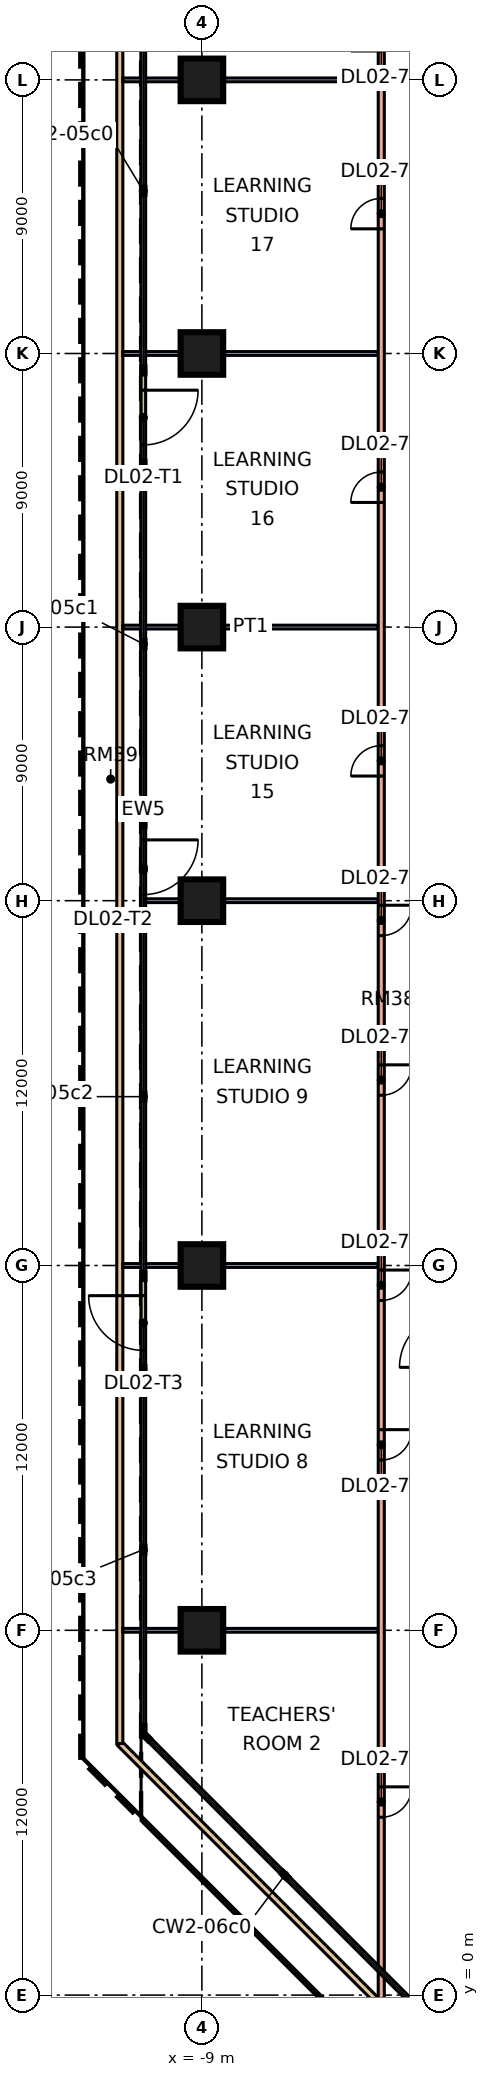
"""IFC4 building model, lengths in metres.
Left out: names, types, materials, properties, quantities, classifications, styles, units other than length and angle.
Written with IfcOpenShell. Run it as: python <this file> out.ifc"""

import sys

from ifc_helpers import new_model, si_unit, direction, frame, frame_2d, origin, origin_2d, place, context, subcontext, project, spatial, rectangle, extrude, element, fill, save


model = new_model("IFC4")
c1 = context("Model", 3, precision=1e-05, world=origin(), true_north=direction((0.0, 1.0)))
c2 = subcontext(c1, "Body", "Model", "MODEL_VIEW")
j1 = project(units=[si_unit("LENGTHUNIT", "METRE"), si_unit("PLANEANGLEUNIT", "RADIAN")], contexts=[c1])
p1 = place(None, origin())
s1 = spatial("IfcSite", under=j1, at=p1, CompositionType="ELEMENT")
p2 = place(p1, origin())
s2 = spatial("IfcBuilding", under=s1, at=p2, CompositionType="ELEMENT")
p3 = place(p2, frame((0.0, 0.0, 12.0)))
s3 = spatial("IfcBuildingStorey", under=s2, at=p3, CompositionType="ELEMENT", Elevation=12.0)
for number, where, z_axis, x_axis in (
    (1, (-9.0, 12.0, 0.0), (0.0, 0.0, 1.0), (1.0, 0.0, 0.0)),
    (2, (-9.0, 24.0, 0.0), (0.0, 0.0, 1.0), (1.0, 0.0, 0.0)),
    (3, (-9.0, 36.0, 0.0), (0.0, 0.0, 1.0), (1.0, 0.0, 0.0)),
    (4, (-9.0, 45.0, 0.0), (0.0, 0.0, 1.0), (1.0, 0.0, 0.0)),
    (5, (-9.0, 54.0, 0.0), (0.0, 0.0, 1.0), (1.0, 0.0, 0.0)),
    (6, (-9.0, 63.0, 0.0), (0.0, 0.0, 1.0), (1.0, 0.0, 0.0)),
):
    element("IfcColumn", number, at=place(p3, frame(where, z_axis=z_axis, x_axis=x_axis)), inside=s3, PredefinedType="COLUMN", context=c2, shape_type="SweptSolid", body=[
        extrude(rectangle(XDim=1.4, YDim=1.4, at=origin_2d()), origin(), (0.0, 0.0, 1.0), 4.8),
    ])
p4 = place(p3, frame((-10.925, 53.393, 0.0), z_axis=(0.0, 0.0, 1.0), x_axis=(0.0, -1.0, 0.0)))
e7 = element("IfcWall", 7, at=p4, inside=s3, PredefinedType="SOLIDWALL", context=c2, shape_type="SweptSolid", body=[
    extrude(rectangle(XDim=3.0, YDim=0.15, at=frame_2d((1.5, 0.0))), origin(), (0.0, 0.0, 1.0), 4.4),
])
p5 = place(p4, frame((0.6, 0.0, 0.0)))
e8 = element("IfcOpeningElement", 8, at=p5, cuts=e7, PredefinedType="OPENING", context=c2, shape_type="SweptSolid", body=[
    extrude(rectangle(XDim=1.8, YDim=2.4, at=frame_2d((0.9, 1.2))), frame((0.0, 0.085, 0.0), z_axis=(0.0, -1.0, 0.0), x_axis=(1.0, 0.0, 0.0)), (0.0, 0.0, 1.0), 0.17),
])
p6 = place(p3, frame((-10.925, 38.5, 0.0), z_axis=(0.0, 0.0, 1.0), x_axis=(0.0, -1.0, 0.0)))
e9 = element("IfcWall", 9, at=p6, inside=s3, PredefinedType="SOLIDWALL", context=c2, shape_type="SweptSolid", body=[
    extrude(rectangle(XDim=3.0, YDim=0.15, at=frame_2d((1.5, 0.0))), origin(), (0.0, 0.0, 1.0), 4.4),
])
p7 = place(p6, frame((0.5, 0.0, 0.0)))
e10 = element("IfcOpeningElement", 10, at=p7, cuts=e9, PredefinedType="OPENING", context=c2, shape_type="SweptSolid", body=[
    extrude(rectangle(XDim=1.8, YDim=2.4, at=frame_2d((0.9, 1.2))), frame((0.0, 0.085, 0.0), z_axis=(0.0, -1.0, 0.0), x_axis=(1.0, 0.0, 0.0)), (0.0, 0.0, 1.0), 0.17),
])
p8 = place(p3, frame((-10.925, 23.607, 0.0), z_axis=(0.0, 0.0, 1.0), x_axis=(0.0, -1.0, 0.0)))
e11 = element("IfcWall", 11, at=p8, inside=s3, PredefinedType="SOLIDWALL", context=c2, shape_type="SweptSolid", body=[
    extrude(rectangle(XDim=3.0, YDim=0.15, at=frame_2d((1.5, 0.0))), origin(), (0.0, 0.0, 1.0), 4.4),
])
p9 = place(p8, frame((0.6, 0.0, 0.0)))
e12 = element("IfcOpeningElement", 12, at=p9, cuts=e11, PredefinedType="OPENING", context=c2, shape_type="SweptSolid", body=[
    extrude(rectangle(XDim=1.8, YDim=2.4, at=frame_2d((0.9, 1.2))), frame((0.0, 0.085, 0.0), z_axis=(0.0, -1.0, 0.0), x_axis=(1.0, 0.0, 0.0)), (0.0, 0.0, 1.0), 0.17),
])
p10 = place(p3, frame((8.275, -11.7, 0.0), z_axis=(0.0, 0.0, 1.0), x_axis=(-0.707106781187, 0.707106781187, 0.0)))
e13 = element("IfcWall", 13, at=p10, inside=s3, PredefinedType="PARAPET", context=c2, shape_type="SweptSolid", body=[
    extrude(rectangle(XDim=28.249, YDim=0.2, at=frame_2d((14.125, 0.0))), origin(), (0.0, 0.0, 1.0), 0.5),
])
p11 = place(p3, frame((-11.7, 8.275, 0.0), z_axis=(0.0, 0.0, 1.0), x_axis=(0.0, 1.0, 0.0)))
e14 = element("IfcWall", 14, at=p11, inside=s3, PredefinedType="PARAPET", context=c2, shape_type="SweptSolid", body=[
    extrude(rectangle(XDim=57.45, YDim=0.2, at=frame_2d((28.725, 0.0))), origin(), (0.0, 0.0, 1.0), 0.5),
])
for number, where, z_axis, x_axis in (
    (15, (-11.6, 12.0, 0.0), (0.0, 0.0, 1.0), (1.0, 0.0, 0.0)),
    (16, (-11.6, 24.0, 0.0), (0.0, 0.0, 1.0), (1.0, 0.0, 0.0)),
    (17, (-11.6, 45.0, 0.0), (0.0, 0.0, 1.0), (1.0, 0.0, 0.0)),
    (18, (-11.6, 54.0, 0.0), (0.0, 0.0, 1.0), (1.0, 0.0, 0.0)),
    (19, (-11.6, 63.0, 0.0), (0.0, 0.0, 1.0), (1.0, 0.0, 0.0)),
):
    element("IfcWall", number, at=place(p3, frame(where, z_axis=z_axis, x_axis=x_axis)), inside=s3, PredefinedType="PARTITIONING", context=c2, shape_type="SweptSolid", body=[
        extrude(rectangle(XDim=8.4, YDim=0.125, at=frame_2d((4.2, 0.0))), origin(), (0.0, 0.0, 1.0), 4.4),
    ])
p12 = place(p3, frame((-10.851, 36.0, 0.0), z_axis=(0.0, 0.0, 1.0), x_axis=(1.0, 0.0, 0.0)))
e20 = element("IfcWall", 20, at=p12, inside=s3, PredefinedType="PARTITIONING", context=c2, shape_type="SweptSolid", body=[
    extrude(rectangle(XDim=7.651, YDim=0.125, at=frame_2d((3.826, 0.0))), origin(), (0.0, 0.0, 1.0), 4.4),
])
p13 = place(p3, frame((-3.1, -0.184, 0.0), z_axis=(0.0, 0.0, 1.0), x_axis=(0.0, 1.0, 0.0)))
e21 = element("IfcWall", 21, at=p13, inside=s3, PredefinedType="PARTITIONING", context=c2, shape_type="SweptSolid", body=[
    extrude(rectangle(XDim=66.284, YDim=0.2, at=frame_2d((33.142, 0.0))), origin(), (0.0, 0.0, 1.0), 4.4),
])
p14 = place(p13, frame((6.034, 0.0, 0.0)))
e22 = element("IfcOpeningElement", 22, at=p14, cuts=e21, PredefinedType="OPENING", context=c2, shape_type="SweptSolid", body=[
    extrude(rectangle(XDim=1.0, YDim=2.1, at=frame_2d((0.5, 1.05))), frame((0.0, 0.11, 0.0), z_axis=(0.0, -1.0, 0.0), x_axis=(1.0, 0.0, 0.0)), (0.0, 0.0, 1.0), 0.22),
])
p15 = place(p13, frame((17.784, 0.0, 0.0)))
e23 = element("IfcOpeningElement", 23, at=p15, cuts=e21, PredefinedType="OPENING", context=c2, shape_type="SweptSolid", body=[
    extrude(rectangle(XDim=1.0, YDim=2.1, at=frame_2d((0.5, 1.05))), frame((0.0, 0.11, 0.0), z_axis=(0.0, -1.0, 0.0), x_axis=(1.0, 0.0, 0.0)), (0.0, 0.0, 1.0), 0.22),
])
p16 = place(p13, frame((23.034, 0.0, 0.0)))
e24 = element("IfcOpeningElement", 24, at=p16, cuts=e21, PredefinedType="OPENING", context=c2, shape_type="SweptSolid", body=[
    extrude(rectangle(XDim=1.0, YDim=2.1, at=frame_2d((0.5, 1.05))), frame((0.0, 0.11, 0.0), z_axis=(0.0, -1.0, 0.0), x_axis=(1.0, 0.0, 0.0)), (0.0, 0.0, 1.0), 0.22),
])
p17 = place(p13, frame((29.784, 0.0, 0.0)))
e25 = element("IfcOpeningElement", 25, at=p17, cuts=e21, PredefinedType="OPENING", context=c2, shape_type="SweptSolid", body=[
    extrude(rectangle(XDim=1.0, YDim=2.1, at=frame_2d((0.5, 1.05))), frame((0.0, 0.11, 0.0), z_axis=(0.0, -1.0, 0.0), x_axis=(1.0, 0.0, 0.0)), (0.0, 0.0, 1.0), 0.22),
])
p18 = place(p13, frame((35.034, 0.0, 0.0)))
e26 = element("IfcOpeningElement", 26, at=p18, cuts=e21, PredefinedType="OPENING", context=c2, shape_type="SweptSolid", body=[
    extrude(rectangle(XDim=1.0, YDim=2.1, at=frame_2d((0.5, 1.05))), frame((0.0, 0.11, 0.0), z_axis=(0.0, -1.0, 0.0), x_axis=(1.0, 0.0, 0.0)), (0.0, 0.0, 1.0), 0.22),
])
p19 = place(p13, frame((40.284, 0.0, 0.0)))
e27 = element("IfcOpeningElement", 27, at=p19, cuts=e21, PredefinedType="OPENING", context=c2, shape_type="SweptSolid", body=[
    extrude(rectangle(XDim=1.0, YDim=2.1, at=frame_2d((0.5, 1.05))), frame((0.0, 0.11, 0.0), z_axis=(0.0, -1.0, 0.0), x_axis=(1.0, 0.0, 0.0)), (0.0, 0.0, 1.0), 0.22),
])
p20 = place(p13, frame((49.284, 0.0, 0.0)))
e28 = element("IfcOpeningElement", 28, at=p20, cuts=e21, PredefinedType="OPENING", context=c2, shape_type="SweptSolid", body=[
    extrude(rectangle(XDim=1.0, YDim=2.1, at=frame_2d((0.5, 1.05))), frame((0.0, 0.11, 0.0), z_axis=(0.0, -1.0, 0.0), x_axis=(1.0, 0.0, 0.0)), (0.0, 0.0, 1.0), 0.22),
])
p21 = place(p13, frame((58.284, 0.0, 0.0)))
e29 = element("IfcOpeningElement", 29, at=p21, cuts=e21, PredefinedType="OPENING", context=c2, shape_type="SweptSolid", body=[
    extrude(rectangle(XDim=1.0, YDim=2.1, at=frame_2d((0.5, 1.05))), frame((0.0, 0.11, 0.0), z_axis=(0.0, -1.0, 0.0), x_axis=(1.0, 0.0, 0.0)), (0.0, 0.0, 1.0), 0.22),
])
p22 = place(p13, frame((64.134, 0.0, 0.0)))
e30 = element("IfcOpeningElement", 30, at=p22, cuts=e21, PredefinedType="OPENING", context=c2, shape_type="SweptSolid", body=[
    extrude(rectangle(XDim=1.0, YDim=2.1, at=frame_2d((0.5, 1.05))), frame((0.0, 0.11, 0.0), z_axis=(0.0, -1.0, 0.0), x_axis=(1.0, 0.0, 0.0)), (0.0, 0.0, 1.0), 0.22),
])
p23 = place(p5, origin())
e31 = element("IfcDoor", 31, at=p23, inside=s3, OperationType="DOUBLE_DOOR_SINGLE_SWING", PredefinedType="DOOR", context=c2, shape_type="SweptSolid", body=[
    extrude(rectangle(XDim=1.8, YDim=2.4, at=frame_2d((0.9, 1.2))), frame((0.0, 0.025, 0.0), z_axis=(0.0, -1.0, 0.0), x_axis=(1.0, 0.0, 0.0)), (0.0, 0.0, 1.0), 0.05),
])
fill(e8, e31)
p24 = place(p7, origin())
e32 = element("IfcDoor", 32, at=p24, inside=s3, OperationType="DOUBLE_DOOR_SINGLE_SWING", PredefinedType="DOOR", context=c2, shape_type="SweptSolid", body=[
    extrude(rectangle(XDim=1.8, YDim=2.4, at=frame_2d((0.9, 1.2))), frame((0.0, 0.025, 0.0), z_axis=(0.0, -1.0, 0.0), x_axis=(1.0, 0.0, 0.0)), (0.0, 0.0, 1.0), 0.05),
])
fill(e10, e32)
p25 = place(p9, frame((1.8, 0.0, 0.0), z_axis=(0.0, 0.0, 1.0), x_axis=(-1.0, 0.0, 0.0)))
e33 = element("IfcDoor", 33, at=p25, inside=s3, OperationType="DOUBLE_DOOR_SINGLE_SWING", PredefinedType="DOOR", context=c2, shape_type="SweptSolid", body=[
    extrude(rectangle(XDim=1.8, YDim=2.4, at=frame_2d((0.9, 1.2))), frame((0.0, 0.025, 0.0), z_axis=(0.0, -1.0, 0.0), x_axis=(1.0, 0.0, 0.0)), (0.0, 0.0, 1.0), 0.05),
])
fill(e12, e33)
p26 = place(p14, origin())
e34 = element("IfcDoor", 34, at=p26, inside=s3, OperationType="SINGLE_SWING_RIGHT", PredefinedType="DOOR", context=c2, shape_type="SweptSolid", body=[
    extrude(rectangle(XDim=1.0, YDim=2.1, at=frame_2d((0.5, 1.05))), frame((0.0, 0.025, 0.0), z_axis=(0.0, -1.0, 0.0), x_axis=(1.0, 0.0, 0.0)), (0.0, 0.0, 1.0), 0.05),
])
fill(e22, e34)
p27 = place(p15, origin())
e35 = element("IfcDoor", 35, at=p27, inside=s3, OperationType="SINGLE_SWING_RIGHT", PredefinedType="DOOR", context=c2, shape_type="SweptSolid", body=[
    extrude(rectangle(XDim=1.0, YDim=2.1, at=frame_2d((0.5, 1.05))), frame((0.0, 0.025, 0.0), z_axis=(0.0, -1.0, 0.0), x_axis=(1.0, 0.0, 0.0)), (0.0, 0.0, 1.0), 0.05),
])
fill(e23, e35)
p28 = place(p16, origin())
e36 = element("IfcDoor", 36, at=p28, inside=s3, OperationType="SINGLE_SWING_RIGHT", PredefinedType="DOOR", context=c2, shape_type="SweptSolid", body=[
    extrude(rectangle(XDim=1.0, YDim=2.1, at=frame_2d((0.5, 1.05))), frame((0.0, 0.025, 0.0), z_axis=(0.0, -1.0, 0.0), x_axis=(1.0, 0.0, 0.0)), (0.0, 0.0, 1.0), 0.05),
])
fill(e24, e36)
p29 = place(p17, origin())
e37 = element("IfcDoor", 37, at=p29, inside=s3, OperationType="SINGLE_SWING_RIGHT", PredefinedType="DOOR", context=c2, shape_type="SweptSolid", body=[
    extrude(rectangle(XDim=1.0, YDim=2.1, at=frame_2d((0.5, 1.05))), frame((0.0, 0.025, 0.0), z_axis=(0.0, -1.0, 0.0), x_axis=(1.0, 0.0, 0.0)), (0.0, 0.0, 1.0), 0.05),
])
fill(e25, e37)
p30 = place(p18, origin())
e38 = element("IfcDoor", 38, at=p30, inside=s3, OperationType="SINGLE_SWING_RIGHT", PredefinedType="DOOR", context=c2, shape_type="SweptSolid", body=[
    extrude(rectangle(XDim=1.0, YDim=2.1, at=frame_2d((0.5, 1.05))), frame((0.0, 0.025, 0.0), z_axis=(0.0, -1.0, 0.0), x_axis=(1.0, 0.0, 0.0)), (0.0, 0.0, 1.0), 0.05),
])
fill(e26, e38)
p31 = place(p19, origin())
e39 = element("IfcDoor", 39, at=p31, inside=s3, OperationType="SINGLE_SWING_LEFT", PredefinedType="DOOR", context=c2, shape_type="SweptSolid", body=[
    extrude(rectangle(XDim=1.0, YDim=2.1, at=frame_2d((0.5, 1.05))), frame((0.0, 0.025, 0.0), z_axis=(0.0, -1.0, 0.0), x_axis=(1.0, 0.0, 0.0)), (0.0, 0.0, 1.0), 0.05),
])
fill(e27, e39)
p32 = place(p20, origin())
e40 = element("IfcDoor", 40, at=p32, inside=s3, OperationType="SINGLE_SWING_LEFT", PredefinedType="DOOR", context=c2, shape_type="SweptSolid", body=[
    extrude(rectangle(XDim=1.0, YDim=2.1, at=frame_2d((0.5, 1.05))), frame((0.0, 0.025, 0.0), z_axis=(0.0, -1.0, 0.0), x_axis=(1.0, 0.0, 0.0)), (0.0, 0.0, 1.0), 0.05),
])
fill(e28, e40)
p33 = place(p21, origin())
e41 = element("IfcDoor", 41, at=p33, inside=s3, OperationType="SINGLE_SWING_LEFT", PredefinedType="DOOR", context=c2, shape_type="SweptSolid", body=[
    extrude(rectangle(XDim=1.0, YDim=2.1, at=frame_2d((0.5, 1.05))), frame((0.0, 0.025, 0.0), z_axis=(0.0, -1.0, 0.0), x_axis=(1.0, 0.0, 0.0)), (0.0, 0.0, 1.0), 0.05),
])
fill(e29, e41)
save(model, sys.argv[1])
